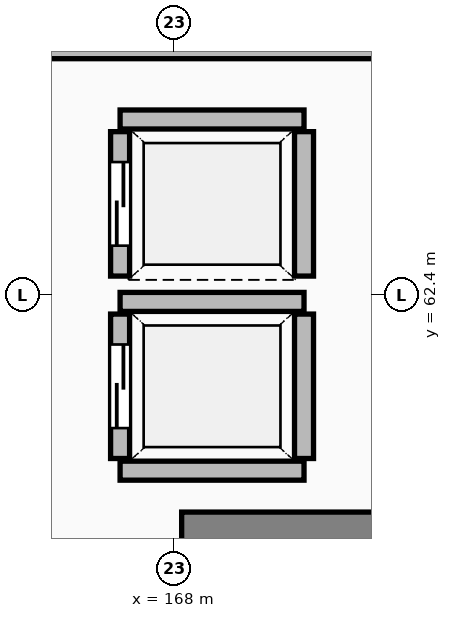
"""IFC4 building model, lengths in metres.
Left out: names, types, materials, properties, quantities, classifications, styles, units other than length and angle.
Written with IfcOpenShell. Run it as: python <this file> out.ifc"""

import sys

from ifc_helpers import new_model, si_unit, direction, frame, frame_2d, origin, place, context, subcontext, project, spatial, rectangle, extrude, element, fill, save


model = new_model("IFC4")
c1 = context("Model", 3, precision=1e-05, world=origin(), true_north=direction((0.0, 1.0)))
c2 = subcontext(c1, "Body", "Model", "MODEL_VIEW")
j1 = project(units=[si_unit("LENGTHUNIT", "METRE"), si_unit("PLANEANGLEUNIT", "RADIAN")], contexts=[c1])
p1 = place(None, origin())
s1 = spatial("IfcSite", under=j1, at=p1, CompositionType="ELEMENT")
p2 = place(p1, origin())
s2 = spatial("IfcBuilding", under=s1, at=p2, CompositionType="ELEMENT")
p3 = place(p2, frame((0.0, 0.0, 6.0)))
s3 = spatial("IfcBuildingStorey", under=s2, at=p3, CompositionType="ELEMENT", Elevation=6.0)
p4 = place(p3, frame((168.1, 59.32, 0.0), z_axis=(0.0, 0.0, 1.0), x_axis=(1.0, 0.0, 0.0)))
e1 = element("IfcWall", 1, at=p4, inside=s3, PredefinedType="SHEAR", context=c2, shape_type="SweptSolid", body=[
    extrude(rectangle(XDim=3.67, YDim=0.45, at=frame_2d((1.835, 0.0))), origin(), (0.0, 0.0, 1.0), 5.1),
])
for number, where, z_axis, x_axis in (
    (2, (167.29, 60.09, 0.0), (0.0, 0.0, 1.0), (1.0, 0.0, 0.0)),
    (3, (167.29, 62.31, 0.0), (0.0, 0.0, 1.0), (1.0, 0.0, 0.0)),
):
    element("IfcWall", number, at=place(p3, frame(where, z_axis=z_axis, x_axis=x_axis)), inside=s3, PredefinedType="SOLIDWALL", context=c2, shape_type="SweptSolid", body=[
        extrude(rectangle(XDim=2.42, YDim=0.25, at=frame_2d((1.21, 0.0))), origin(), (0.0, 0.0, 1.0), 5.1),
    ])
p5 = place(p3, frame((167.29, 60.25, 0.0), z_axis=(0.0, 0.0, 1.0), x_axis=(0.0, 1.0, 0.0)))
e4 = element("IfcWall", 4, at=p5, inside=s3, PredefinedType="SOLIDWALL", context=c2, shape_type="SweptSolid", body=[
    extrude(rectangle(XDim=1.9, YDim=0.25, at=frame_2d((0.95, 0.0))), origin(), (0.0, 0.0, 1.0), 5.1),
])
p6 = place(p5, frame((0.4, 0.0, 0.0)))
e5 = element("IfcOpeningElement", 5, at=p6, cuts=e4, PredefinedType="OPENING", context=c2, shape_type="SweptSolid", body=[
    extrude(rectangle(XDim=1.1, YDim=2.2, at=frame_2d((0.55, 1.1))), frame((0.0, 0.137, 0.0), z_axis=(0.0, -1.0, 0.0), x_axis=(1.0, 0.0, 0.0)), (0.0, 0.0, 1.0), 0.274),
])
p7 = place(p3, frame((169.71, 60.25, 0.0), z_axis=(0.0, 0.0, 1.0), x_axis=(0.0, 1.0, 0.0)))
e6 = element("IfcWall", 6, at=p7, inside=s3, PredefinedType="SOLIDWALL", context=c2, shape_type="SweptSolid", body=[
    extrude(rectangle(XDim=1.9, YDim=0.25, at=frame_2d((0.95, 0.0))), origin(), (0.0, 0.0, 1.0), 5.1),
])
p8 = place(p3, frame((167.29, 64.71, 0.0), z_axis=(0.0, 0.0, 1.0), x_axis=(1.0, 0.0, 0.0)))
e7 = element("IfcWall", 7, at=p8, inside=s3, PredefinedType="SOLIDWALL", context=c2, shape_type="SweptSolid", body=[
    extrude(rectangle(XDim=2.42, YDim=0.25, at=frame_2d((1.21, 0.0))), origin(), (0.0, 0.0, 1.0), 5.1),
])
p9 = place(p3, frame((167.29, 62.65, 0.0), z_axis=(0.0, 0.0, 1.0), x_axis=(0.0, 1.0, 0.0)))
e8 = element("IfcWall", 8, at=p9, inside=s3, PredefinedType="SOLIDWALL", context=c2, shape_type="SweptSolid", body=[
    extrude(rectangle(XDim=1.9, YDim=0.25, at=frame_2d((0.95, 0.0))), origin(), (0.0, 0.0, 1.0), 5.1),
])
p10 = place(p9, frame((0.4, 0.0, 0.0)))
e9 = element("IfcOpeningElement", 9, at=p10, cuts=e8, PredefinedType="OPENING", context=c2, shape_type="SweptSolid", body=[
    extrude(rectangle(XDim=1.1, YDim=2.2, at=frame_2d((0.55, 1.1))), frame((0.0, 0.137, 0.0), z_axis=(0.0, -1.0, 0.0), x_axis=(1.0, 0.0, 0.0)), (0.0, 0.0, 1.0), 0.274),
])
p11 = place(p3, frame((169.71, 62.65, 0.0), z_axis=(0.0, 0.0, 1.0), x_axis=(0.0, 1.0, 0.0)))
e10 = element("IfcWall", 10, at=p11, inside=s3, PredefinedType="SOLIDWALL", context=c2, shape_type="SweptSolid", body=[
    extrude(rectangle(XDim=1.9, YDim=0.25, at=frame_2d((0.95, 0.0))), origin(), (0.0, 0.0, 1.0), 5.1),
])
p12 = place(p3, frame((166.1, 65.6, 0.0), z_axis=(0.0, 0.0, 1.0), x_axis=(1.0, 0.0, 0.0)))
e11 = element("IfcWall", 11, at=p12, inside=s3, PredefinedType="PARTITIONING", context=c2, shape_type="SweptSolid", body=[
    extrude(rectangle(XDim=13.0, YDim=0.18, at=frame_2d((6.5, 0.0))), origin(), (0.0, 0.0, 1.0), 4.312),
])
p13 = place(p6, origin())
e12 = element("IfcDoor", 12, at=p13, inside=s3, OperationType="SLIDING_TO_LEFT", PredefinedType="DOOR", context=c2, shape_type="SweptSolid", body=[
    extrude(rectangle(XDim=1.1, YDim=2.2, at=frame_2d((0.55, 1.1))), frame((0.0, 0.025, 0.0), z_axis=(0.0, -1.0, 0.0), x_axis=(1.0, 0.0, 0.0)), (0.0, 0.0, 1.0), 0.05),
])
fill(e5, e12)
p14 = place(p10, origin())
e13 = element("IfcDoor", 13, at=p14, inside=s3, OperationType="SLIDING_TO_LEFT", PredefinedType="DOOR", context=c2, shape_type="SweptSolid", body=[
    extrude(rectangle(XDim=1.1, YDim=2.2, at=frame_2d((0.55, 1.1))), frame((0.0, 0.025, 0.0), z_axis=(0.0, -1.0, 0.0), x_axis=(1.0, 0.0, 0.0)), (0.0, 0.0, 1.0), 0.05),
])
fill(e9, e13)
save(model, sys.argv[1])
